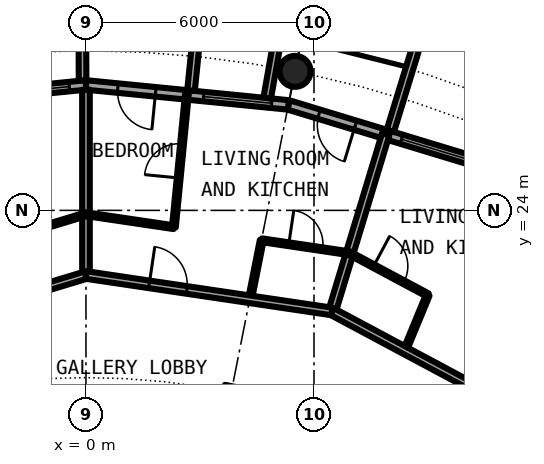
"""IFC4 building model, lengths in metres.
Left out: names, types, materials, properties, quantities, classifications, styles, units other than length and angle.
Written with IfcOpenShell. Run it as: python <this file> out.ifc"""

import sys

from ifc_helpers import new_model, si_unit, direction, frame, frame_2d, origin, origin_2d, place, context, subcontext, project, spatial, rectangle, circle, hollow_circle, extrude, element, fill, save


model = new_model("IFC4")
c1 = context("Model", 3, precision=1e-05, world=origin(), true_north=direction((0.0, 1.0)))
c2 = subcontext(c1, "Body", "Model", "MODEL_VIEW")
j1 = project(units=[si_unit("LENGTHUNIT", "METRE"), si_unit("PLANEANGLEUNIT", "RADIAN")], contexts=[c1])
p1 = place(None, origin())
s1 = spatial("IfcSite", under=j1, at=p1, CompositionType="ELEMENT")
p2 = place(p1, origin())
s2 = spatial("IfcBuilding", under=s1, at=p2, CompositionType="ELEMENT")
p3 = place(p2, frame((0.0, 0.0, 202.4)))
s3 = spatial("IfcBuildingStorey", under=s2, at=p3, CompositionType="ELEMENT", Elevation=202.4)
p4 = place(p3, frame((5.501, 27.658, 0.0), z_axis=(0.0, 0.0, 1.0), x_axis=(1.0, 0.0, 0.0)))
e1 = element("IfcColumn", 1, at=p4, inside=s3, PredefinedType="COLUMN", context=c2, shape_type="SweptSolid", body=[
    extrude(hollow_circle(Radius=0.406, WallThickness=0.03, at=origin_2d()), origin(), (0.0, 0.0, 1.0), 3.05),
])
p5 = place(p3, frame((10.447, 25.222, 0.0), z_axis=(0.0, 0.0, 1.0), x_axis=(-0.956965678721, 0.290201119486, 0.0)))
e2 = element("IfcWall", 2, at=p5, inside=s3, PredefinedType="SOLIDWALL", context=c2, shape_type="SweptSolid", body=[
    extrude(rectangle(XDim=5.351, YDim=0.25, at=frame_2d((2.676, 0.0))), origin(), (0.0, 0.0, 1.0), 2.7),
])
p6 = place(p5, frame((0.441, 0.0, 0.3)))
e3 = element("IfcOpeningElement", 3, at=p6, cuts=e2, PredefinedType="OPENING", context=c2, shape_type="SweptSolid", body=[
    extrude(rectangle(XDim=1.8, YDim=2.1, at=frame_2d((0.9, 1.05))), frame((0.0, 0.135, 0.0), z_axis=(0.0, -1.0, 0.0), x_axis=(1.0, 0.0, 0.0)), (0.0, 0.0, 1.0), 0.27),
])
p7 = place(p5, frame((3.51, 0.0, 0.0)))
e4 = element("IfcOpeningElement", 4, at=p7, cuts=e2, PredefinedType="OPENING", context=c2, shape_type="SweptSolid", body=[
    extrude(rectangle(XDim=1.0, YDim=2.2, at=frame_2d((0.5, 1.1))), frame((0.0, 0.135, 0.0), z_axis=(0.0, -1.0, 0.0), x_axis=(1.0, 0.0, 0.0)), (0.0, 0.0, 1.0), 0.27),
])
p8 = place(p3, frame((11.638, 28.084, -0.03), z_axis=(0.0, 0.0, 1.0), x_axis=(-0.941461077774, 0.337121697664, 0.0)))
e5 = element("IfcWall", 5, at=p8, inside=s3, PredefinedType="SOLIDWALL", context=c2, shape_type="SweptSolid", body=[
    extrude(rectangle(XDim=2.993, YDim=0.2, at=frame_2d((1.497, 0.0))), origin(), (0.0, 0.0, 1.0), 2.73),
])
p9 = place(p8, frame((0.457, 0.0, 0.33)))
e6 = element("IfcOpeningElement", 6, at=p9, cuts=e5, PredefinedType="OPENING", context=c2, shape_type="SweptSolid", body=[
    extrude(circle(Radius=1.04, at=frame_2d((1.04, 1.04))), frame((0.0, 0.11, 0.0), z_axis=(0.0, -1.0, 0.0), x_axis=(1.0, 0.0, 0.0)), (0.0, 0.0, 1.0), 0.22),
])
p10 = place(p3, frame((8.009, 26.092, -0.03), z_axis=(0.0, 0.0, 1.0), x_axis=(0.293406695073, 0.955987715029, 0.0)))
e7 = element("IfcWall", 7, at=p10, inside=s3, PredefinedType="SOLIDWALL", context=c2, shape_type="SweptSolid", body=[
    extrude(rectangle(XDim=3.006, YDim=0.2, at=frame_2d((1.503, 0.0))), origin(), (0.0, 0.0, 1.0), 2.73),
])
p11 = place(p3, frame((5.326, 26.775, 0.0), z_axis=(0.0, 0.0, 1.0), x_axis=(-0.995173996315, 0.098126026407, 0.0)))
e8 = element("IfcWall", 8, at=p11, inside=s3, PredefinedType="SOLIDWALL", context=c2, shape_type="SweptSolid", body=[
    extrude(rectangle(XDim=5.352, YDim=0.25, at=frame_2d((2.676, 0.0))), origin(), (0.0, 0.0, 1.0), 2.7),
])
p12 = place(p11, frame((0.441, 0.0, 0.3)))
e9 = element("IfcOpeningElement", 9, at=p12, cuts=e8, PredefinedType="OPENING", context=c2, shape_type="SweptSolid", body=[
    extrude(rectangle(XDim=1.8, YDim=2.1, at=frame_2d((0.9, 1.05))), frame((0.0, 0.135, 0.0), z_axis=(0.0, -1.0, 0.0), x_axis=(1.0, 0.0, 0.0)), (0.0, 0.0, 1.0), 0.27),
])
p13 = place(p11, frame((3.51, 0.0, 0.0)))
e10 = element("IfcOpeningElement", 10, at=p13, cuts=e8, PredefinedType="OPENING", context=c2, shape_type="SweptSolid", body=[
    extrude(rectangle(XDim=1.0, YDim=2.2, at=frame_2d((0.5, 1.1))), frame((0.0, 0.135, 0.0), z_axis=(0.0, -1.0, 0.0), x_axis=(1.0, 0.0, 0.0)), (0.0, 0.0, 1.0), 0.27),
])
p14 = place(p3, frame((4.769, 26.956, -0.03), z_axis=(0.0, 0.0, 1.0), x_axis=(0.174056778901, 0.984735618183, 0.0)))
e11 = element("IfcWall", 11, at=p14, inside=s3, PredefinedType="SOLIDWALL", context=c2, shape_type="SweptSolid", body=[
    extrude(rectangle(XDim=2.925, YDim=0.2, at=frame_2d((1.462, 0.0))), origin(), (0.0, 0.0, 1.0), 2.73),
])
p15 = place(p3, frame((2.764, 27.153, -0.03), z_axis=(0.0, 0.0, 1.0), x_axis=(0.101505487237, 0.994834979311, 0.0)))
e12 = element("IfcWall", 12, at=p15, inside=s3, PredefinedType="SOLIDWALL", context=c2, shape_type="SweptSolid", body=[
    extrude(rectangle(XDim=3.007, YDim=0.2, at=frame_2d((1.503, 0.0))), origin(), (0.0, 0.0, 1.0), 2.73),
])
p16 = place(p3, frame((0.0, 27.3, 0.0), z_axis=(0.0, 0.0, 1.0), x_axis=(-0.995173996315, -0.098126026407, 0.0)))
e13 = element("IfcWall", 13, at=p16, inside=s3, PredefinedType="SOLIDWALL", context=c2, shape_type="SweptSolid", body=[
    extrude(rectangle(XDim=5.352, YDim=0.25, at=frame_2d((2.676, 0.0))), origin(), (0.0, 0.0, 1.0), 2.7),
])
p17 = place(p16, frame((0.441, 0.0, 0.3)))
e14 = element("IfcOpeningElement", 14, at=p17, cuts=e13, PredefinedType="OPENING", context=c2, shape_type="SweptSolid", body=[
    extrude(rectangle(XDim=1.8, YDim=2.1, at=frame_2d((0.9, 1.05))), frame((0.0, 0.135, 0.0), z_axis=(0.0, -1.0, 0.0), x_axis=(1.0, 0.0, 0.0)), (0.0, 0.0, 1.0), 0.27),
])
p18 = place(p16, frame((3.51, 0.0, 0.0)))
e15 = element("IfcOpeningElement", 15, at=p18, cuts=e13, PredefinedType="OPENING", context=c2, shape_type="SweptSolid", body=[
    extrude(rectangle(XDim=1.0, YDim=2.2, at=frame_2d((0.5, 1.1))), frame((0.0, 0.135, 0.0), z_axis=(0.0, -1.0, 0.0), x_axis=(1.0, 0.0, 0.0)), (0.0, 0.0, 1.0), 0.27),
])
p19 = place(p3, frame((-0.09, 27.417, -0.03), z_axis=(0.0, 0.0, 1.0), x_axis=(-0.00347308367, 0.999993968827, 0.0)))
e16 = element("IfcWall", 16, at=p19, inside=s3, PredefinedType="SOLIDWALL", context=c2, shape_type="SweptSolid", body=[
    extrude(rectangle(XDim=2.882, YDim=0.2, at=frame_2d((1.441, 0.0))), origin(), (0.0, 0.0, 1.0), 2.73),
])
p20 = place(p3, frame((4.316, 21.66, 0.0), z_axis=(0.0, 0.0, 1.0), x_axis=(0.195049398273, 0.980793419754, 0.0)))
e17 = element("IfcWall", 17, at=p20, inside=s3, PredefinedType="PARTITIONING", context=c2, shape_type="SweptSolid", body=[
    extrude(rectangle(XDim=1.585, YDim=0.1, at=frame_2d((0.792, 0.0))), origin(), (0.0, 0.0, 1.0), 2.7),
])
p21 = place(p3, frame((0.0, 22.3, 0.0), z_axis=(0.0, 0.0, 1.0), x_axis=(0.0, 1.0, 0.0)))
e18 = element("IfcWall", 18, at=p21, inside=s3, PredefinedType="PARTITIONING", context=c2, shape_type="SweptSolid", body=[
    extrude(rectangle(XDim=4.875, YDim=0.2, at=frame_2d((2.438, 0.0))), origin(), (0.0, 0.0, 1.0), 2.7),
])
p22 = place(p3, frame((2.313, 23.557, 0.0), z_axis=(0.0, 0.0, 1.0), x_axis=(0.09759306994, 0.995226402734, 0.0)))
e19 = element("IfcWall", 19, at=p22, inside=s3, PredefinedType="PARTITIONING", context=c2, shape_type="SweptSolid", body=[
    extrude(rectangle(XDim=3.505, YDim=0.1, at=frame_2d((1.752, 0.0))), origin(), (0.0, 0.0, 1.0), 2.7),
])
p23 = place(p22, frame((1.302, 0.0, 0.0)))
e20 = element("IfcOpeningElement", 20, at=p23, cuts=e19, PredefinedType="OPENING", context=c2, shape_type="SweptSolid", body=[
    extrude(rectangle(XDim=0.9, YDim=2.3, at=frame_2d((0.45, 1.15))), frame((0.0, 0.06, 0.0), z_axis=(0.0, -1.0, 0.0), x_axis=(1.0, 0.0, 0.0)), (0.0, 0.0, 1.0), 0.12),
])
p24 = place(p3, frame((6.474, 21.34, 0.0), z_axis=(0.0, 0.0, 1.0), x_axis=(0.290053269332, 0.957010502006, 0.0)))
e21 = element("IfcWall", 21, at=p24, inside=s3, PredefinedType="PARTITIONING", context=c2, shape_type="SweptSolid", body=[
    extrude(rectangle(XDim=4.874, YDim=0.2, at=frame_2d((2.437, 0.0))), origin(), (0.0, 0.0, 1.0), 2.7),
])
p25 = place(p3, frame((8.392, 20.314, 0.0), z_axis=(0.0, 0.0, 1.0), x_axis=(0.381535938362, 0.924354005638, 0.0)))
e22 = element("IfcWall", 22, at=p25, inside=s3, PredefinedType="PARTITIONING", context=c2, shape_type="SweptSolid", body=[
    extrude(rectangle(XDim=1.577, YDim=0.1, at=frame_2d((0.789, 0.0))), origin(), (0.0, 0.0, 1.0), 2.7),
])
p26 = place(p3, frame((-12.389, 18.542, 0.0), z_axis=(0.0, 0.0, 1.0), x_axis=(0.956994750783, 0.290105234311, 0.0)))
e23 = element("IfcWall", 23, at=p26, inside=s3, PredefinedType="PARTITIONING", context=c2, shape_type="SweptSolid", body=[
    extrude(rectangle(XDim=12.951, YDim=0.2, at=frame_2d((6.475, 0.0))), origin(), (0.0, 0.0, 1.0), 2.7),
])
p27 = place(p26, frame((5.974, 0.0, 0.0)))
e24 = element("IfcOpeningElement", 24, at=p27, cuts=e23, PredefinedType="OPENING", context=c2, shape_type="SweptSolid", body=[
    extrude(rectangle(XDim=1.0, YDim=2.3, at=frame_2d((0.5, 1.15))), frame((0.0, 0.11, 0.0), z_axis=(0.0, -1.0, 0.0), x_axis=(1.0, 0.0, 0.0)), (0.0, 0.0, 1.0), 0.22),
])
p28 = place(p3, frame((6.473, 21.34, 0.0), z_axis=(0.0, 0.0, 1.0), x_axis=(0.881869539497, -0.471493494448, 0.0)))
e25 = element("IfcWall", 25, at=p28, inside=s3, PredefinedType="PARTITIONING", context=c2, shape_type="SweptSolid", body=[
    extrude(rectangle(XDim=8.704, YDim=0.2, at=frame_2d((4.352, 0.0))), origin(), (0.0, 0.0, 1.0), 2.7),
])
p29 = place(p28, frame((4.939, 0.0, 0.0)))
e26 = element("IfcOpeningElement", 26, at=p29, cuts=e25, PredefinedType="OPENING", context=c2, shape_type="SweptSolid", body=[
    extrude(rectangle(XDim=1.0, YDim=2.3, at=frame_2d((0.5, 1.15))), frame((0.0, 0.11, 0.0), z_axis=(0.0, -1.0, 0.0), x_axis=(1.0, 0.0, 0.0)), (0.0, 0.0, 1.0), 0.22),
])
p30 = place(p3, frame((0.0, 22.3, 0.0), z_axis=(0.0, 0.0, 1.0), x_axis=(0.989181015112, -0.146700100005, 0.0)))
e27 = element("IfcWall", 27, at=p30, inside=s3, PredefinedType="PARTITIONING", context=c2, shape_type="SweptSolid", body=[
    extrude(rectangle(XDim=6.544, YDim=0.2, at=frame_2d((3.272, 0.0))), origin(), (0.0, 0.0, 1.0), 2.7),
])
p31 = place(p30, frame((1.682, 0.0, 0.0)))
e28 = element("IfcOpeningElement", 28, at=p31, cuts=e27, PredefinedType="OPENING", context=c2, shape_type="SweptSolid", body=[
    extrude(rectangle(XDim=1.0, YDim=2.3, at=frame_2d((0.5, 1.15))), frame((0.0, 0.11, 0.0), z_axis=(0.0, -1.0, 0.0), x_axis=(1.0, 0.0, 0.0)), (0.0, 0.0, 1.0), 0.22),
])
p32 = place(p3, frame((-6.639, 21.885, 0.0), z_axis=(0.0, 0.0, 1.0), x_axis=(0.956990364662, 0.290119702785, 0.0)))
e29 = element("IfcWall", 29, at=p32, inside=s3, PredefinedType="PARTITIONING", context=c2, shape_type="SweptSolid", body=[
    extrude(rectangle(XDim=6.938, YDim=0.1, at=frame_2d((3.469, 0.0))), origin(), (0.0, 0.0, 1.0), 2.7),
])
p33 = place(p32, frame((3.022, 0.0, 0.0)))
e30 = element("IfcOpeningElement", 30, at=p33, cuts=e29, PredefinedType="OPENING", context=c2, shape_type="SweptSolid", body=[
    extrude(rectangle(XDim=0.9, YDim=2.3, at=frame_2d((0.45, 1.15))), frame((0.0, 0.06, 0.0), z_axis=(0.0, -1.0, 0.0), x_axis=(1.0, 0.0, 0.0)), (0.0, 0.0, 1.0), 0.12),
])
p34 = place(p3, frame((6.938, 22.871, 0.0), z_axis=(0.0, 0.0, 1.0), x_axis=(0.881882873346, -0.471468554305, 0.0)))
e31 = element("IfcWall", 31, at=p34, inside=s3, PredefinedType="PARTITIONING", context=c2, shape_type="SweptSolid", body=[
    extrude(rectangle(XDim=2.331, YDim=0.1, at=frame_2d((1.166, 0.0))), origin(), (0.0, 0.0, 1.0), 2.7),
])
p35 = place(p34, frame((0.716, 0.0, 0.0)))
e32 = element("IfcOpeningElement", 32, at=p35, cuts=e31, PredefinedType="OPENING", context=c2, shape_type="SweptSolid", body=[
    extrude(rectangle(XDim=0.9, YDim=2.3, at=frame_2d((0.45, 1.15))), frame((0.0, 0.06, 0.0), z_axis=(0.0, -1.0, 0.0), x_axis=(1.0, 0.0, 0.0)), (0.0, 0.0, 1.0), 0.12),
])
p36 = place(p3, frame((0.0, 23.9, 0.0), z_axis=(0.0, 0.0, 1.0), x_axis=(0.989181588285, -0.146696235121, 0.0)))
e33 = element("IfcWall", 33, at=p36, inside=s3, PredefinedType="PARTITIONING", context=c2, shape_type="SweptSolid", body=[
    extrude(rectangle(XDim=2.338, YDim=0.1, at=frame_2d((1.169, 0.0))), origin(), (0.0, 0.0, 1.0), 2.7),
])
p37 = place(p3, frame((4.625, 23.214, 0.0), z_axis=(0.0, 0.0, 1.0), x_axis=(0.989181588285, -0.146696235121, 0.0)))
e34 = element("IfcWall", 34, at=p37, inside=s3, PredefinedType="PARTITIONING", context=c2, shape_type="SweptSolid", body=[
    extrude(rectangle(XDim=2.338, YDim=0.1, at=frame_2d((1.169, 0.0))), origin(), (0.0, 0.0, 1.0), 2.7),
])
p38 = place(p37, frame((0.719, 0.0, 0.0)))
e35 = element("IfcOpeningElement", 35, at=p38, cuts=e34, PredefinedType="OPENING", context=c2, shape_type="SweptSolid", body=[
    extrude(rectangle(XDim=0.9, YDim=2.3, at=frame_2d((0.45, 1.15))), frame((0.0, 0.06, 0.0), z_axis=(0.0, -1.0, 0.0), x_axis=(1.0, 0.0, 0.0)), (0.0, 0.0, 1.0), 0.12),
])
p39 = place(p6, origin())
e36 = element("IfcWindow", 36, at=p39, inside=s3, PartitioningType="SINGLE_PANEL", PredefinedType="WINDOW", context=c2, shape_type="SweptSolid", body=[
    extrude(rectangle(XDim=1.8, YDim=2.1, at=frame_2d((0.9, 1.05))), frame((0.0, 0.03, 0.0), z_axis=(0.0, -1.0, 0.0), x_axis=(1.0, 0.0, 0.0)), (0.0, 0.0, 1.0), 0.06),
])
fill(e3, e36)
p40 = place(p7, origin())
e37 = element("IfcDoor", 37, at=p40, inside=s3, OperationType="SINGLE_SWING_LEFT", PredefinedType="DOOR", context=c2, shape_type="SweptSolid", body=[
    extrude(rectangle(XDim=1.0, YDim=2.2, at=frame_2d((0.5, 1.1))), frame((0.0, 0.025, 0.0), z_axis=(0.0, -1.0, 0.0), x_axis=(1.0, 0.0, 0.0)), (0.0, 0.0, 1.0), 0.05),
])
fill(e4, e37)
p41 = place(p12, origin())
e38 = element("IfcWindow", 38, at=p41, inside=s3, PartitioningType="SINGLE_PANEL", PredefinedType="WINDOW", context=c2, shape_type="SweptSolid", body=[
    extrude(rectangle(XDim=1.8, YDim=2.1, at=frame_2d((0.9, 1.05))), frame((0.0, 0.03, 0.0), z_axis=(0.0, -1.0, 0.0), x_axis=(1.0, 0.0, 0.0)), (0.0, 0.0, 1.0), 0.06),
])
fill(e9, e38)
p42 = place(p13, origin())
e39 = element("IfcDoor", 39, at=p42, inside=s3, OperationType="SINGLE_SWING_LEFT", PredefinedType="DOOR", context=c2, shape_type="SweptSolid", body=[
    extrude(rectangle(XDim=1.0, YDim=2.2, at=frame_2d((0.5, 1.1))), frame((0.0, 0.025, 0.0), z_axis=(0.0, -1.0, 0.0), x_axis=(1.0, 0.0, 0.0)), (0.0, 0.0, 1.0), 0.05),
])
fill(e10, e39)
p43 = place(p17, origin())
e40 = element("IfcWindow", 40, at=p43, inside=s3, PartitioningType="SINGLE_PANEL", PredefinedType="WINDOW", context=c2, shape_type="SweptSolid", body=[
    extrude(rectangle(XDim=1.8, YDim=2.1, at=frame_2d((0.9, 1.05))), frame((0.0, 0.03, 0.0), z_axis=(0.0, -1.0, 0.0), x_axis=(1.0, 0.0, 0.0)), (0.0, 0.0, 1.0), 0.06),
])
fill(e14, e40)
p44 = place(p35, origin())
e41 = element("IfcDoor", 41, at=p44, inside=s3, OperationType="SINGLE_SWING_RIGHT", PredefinedType="DOOR", context=c2, shape_type="SweptSolid", body=[
    extrude(rectangle(XDim=0.9, YDim=2.3, at=frame_2d((0.45, 1.15))), frame((0.0, 0.025, 0.0), z_axis=(0.0, -1.0, 0.0), x_axis=(1.0, 0.0, 0.0)), (0.0, 0.0, 1.0), 0.05),
])
fill(e32, e41)
p45 = place(p31, origin())
e42 = element("IfcDoor", 42, at=p45, inside=s3, OperationType="SINGLE_SWING_LEFT", PredefinedType="DOOR", context=c2, shape_type="SweptSolid", body=[
    extrude(rectangle(XDim=1.0, YDim=2.3, at=frame_2d((0.5, 1.15))), frame((0.0, 0.025, 0.0), z_axis=(0.0, -1.0, 0.0), x_axis=(1.0, 0.0, 0.0)), (0.0, 0.0, 1.0), 0.05),
])
fill(e28, e42)
p46 = place(p38, origin())
e43 = element("IfcDoor", 43, at=p46, inside=s3, OperationType="SINGLE_SWING_RIGHT", PredefinedType="DOOR", context=c2, shape_type="SweptSolid", body=[
    extrude(rectangle(XDim=0.9, YDim=2.3, at=frame_2d((0.45, 1.15))), frame((0.0, 0.025, 0.0), z_axis=(0.0, -1.0, 0.0), x_axis=(1.0, 0.0, 0.0)), (0.0, 0.0, 1.0), 0.05),
])
fill(e35, e43)
p47 = place(p23, origin())
e44 = element("IfcDoor", 44, at=p47, inside=s3, OperationType="SINGLE_SWING_LEFT", PredefinedType="DOOR", context=c2, shape_type="SweptSolid", body=[
    extrude(rectangle(XDim=0.9, YDim=2.3, at=frame_2d((0.45, 1.15))), frame((0.0, 0.025, 0.0), z_axis=(0.0, -1.0, 0.0), x_axis=(1.0, 0.0, 0.0)), (0.0, 0.0, 1.0), 0.05),
])
fill(e20, e44)
save(model, sys.argv[1])
